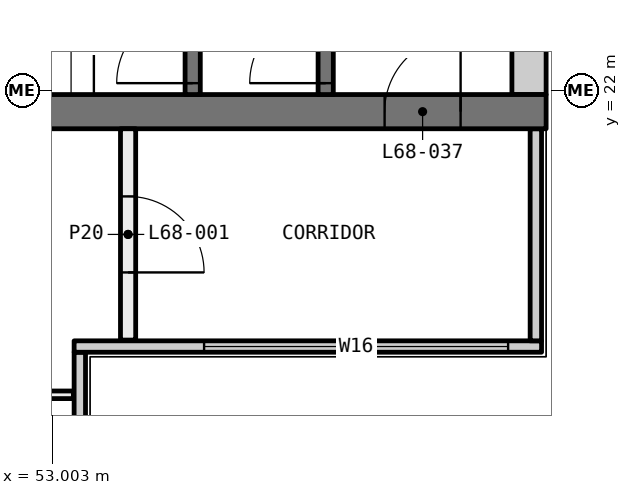
"""IFC4 building model, lengths in metres.
Left out: names, types, materials, properties, quantities, classifications, styles, units other than length and angle.
Written with IfcOpenShell. Run it as: python <this file> out.ifc"""

import sys

from ifc_helpers import new_model, si_unit, direction, frame, frame_2d, origin, place, context, subcontext, project, spatial, rectangle, extrude, element, fill, save


model = new_model("IFC4")
c1 = context("Model", 3, precision=1e-05, world=origin(), true_north=direction((0.0, 1.0)))
c2 = subcontext(c1, "Body", "Model", "MODEL_VIEW")
j1 = project(units=[si_unit("LENGTHUNIT", "METRE"), si_unit("PLANEANGLEUNIT", "RADIAN")], contexts=[c1])
p1 = place(None, origin())
s1 = spatial("IfcSite", under=j1, at=p1, CompositionType="ELEMENT")
p2 = place(p1, origin())
s2 = spatial("IfcBuilding", under=s1, at=p2, CompositionType="ELEMENT")
p3 = place(p2, frame((0.0, 0.0, 252.45)))
s3 = spatial("IfcBuildingStorey", under=s2, at=p3, CompositionType="ELEMENT", Elevation=252.45)
p4 = place(p3, frame((53.365, 12.71, 0.0), z_axis=(0.0, 0.0, 1.0), x_axis=(0.0, 1.0, 0.0)))
e1 = element("IfcWall", 1, at=p4, inside=s3, PredefinedType="ELEMENTEDWALL", context=c2, shape_type="SweptSolid", body=[
    extrude(rectangle(XDim=5.85, YDim=0.15, at=frame_2d((2.925, 0.0))), origin(), (0.0, 0.0, 1.0), 3.05),
])
p5 = place(p4, frame((0.29, 0.0, 0.45)))
e2 = element("IfcOpeningElement", 2, at=p5, cuts=e1, PredefinedType="OPENING", context=c2, shape_type="SweptSolid", body=[
    extrude(rectangle(XDim=4.0, YDim=2.55, at=frame_2d((2.0, 1.275))), frame((0.0, 0.085, 0.0), z_axis=(0.0, -1.0, 0.0), x_axis=(1.0, 0.0, 0.0)), (0.0, 0.0, 1.0), 0.17),
])
p6 = place(p3, frame((53.29, 18.635, 0.0), z_axis=(0.0, 0.0, 1.0), x_axis=(1.0, 0.0, 0.0)))
e3 = element("IfcWall", 3, at=p6, inside=s3, PredefinedType="ELEMENTEDWALL", context=c2, shape_type="SweptSolid", body=[
    extrude(rectangle(XDim=6.15, YDim=0.15, at=frame_2d((3.075, 0.0))), origin(), (0.0, 0.0, 1.0), 3.05),
])
p7 = place(p6, frame((1.71, 0.0, 0.45)))
e4 = element("IfcOpeningElement", 4, at=p7, cuts=e3, PredefinedType="OPENING", context=c2, shape_type="SweptSolid", body=[
    extrude(rectangle(XDim=4.0, YDim=2.55, at=frame_2d((2.0, 1.275))), frame((0.0, 0.085, 0.0), z_axis=(0.0, -1.0, 0.0), x_axis=(1.0, 0.0, 0.0)), (0.0, 0.0, 1.0), 0.17),
])
p8 = place(p3, frame((59.365, 18.71, 0.0), z_axis=(0.0, 0.0, 1.0), x_axis=(0.0, 1.0, 0.0)))
e5 = element("IfcWall", 5, at=p8, inside=s3, PredefinedType="ELEMENTEDWALL", context=c2, shape_type="SweptSolid", body=[
    extrude(rectangle(XDim=2.79, YDim=0.15, at=frame_2d((1.395, 0.0))), origin(), (0.0, 0.0, 1.0), 3.05),
])
p9 = place(p3, frame((53.28, 18.0, 0.0), z_axis=(0.0, 0.0, 1.0), x_axis=(-1.0, 0.0, 0.0)))
e6 = element("IfcWall", 6, at=p9, inside=s3, PredefinedType="PARTITIONING", context=c2, shape_type="SweptSolid", body=[
    extrude(rectangle(XDim=4.78, YDim=0.1, at=frame_2d((2.39, 0.0))), origin(), (0.0, 0.0, 1.0), 3.05),
])
p10 = place(p3, frame((54.0, 18.72, 0.0), z_axis=(0.0, 0.0, 1.0), x_axis=(0.0, 1.0, 0.0)))
e7 = element("IfcWall", 7, at=p10, inside=s3, PredefinedType="PARTITIONING", context=c2, shape_type="SweptSolid", body=[
    extrude(rectangle(XDim=2.78, YDim=0.2, at=frame_2d((1.39, 0.0))), origin(), (0.0, 0.0, 1.0), 3.05),
])
p11 = place(p10, frame((0.89, 0.0, 0.0)))
e8 = element("IfcOpeningElement", 8, at=p11, cuts=e7, PredefinedType="OPENING", context=c2, shape_type="SweptSolid", body=[
    extrude(rectangle(XDim=1.0, YDim=2.1, at=frame_2d((0.5, 1.05))), frame((0.0, 0.11, 0.0), z_axis=(0.0, -1.0, 0.0), x_axis=(1.0, 0.0, 0.0)), (0.0, 0.0, 1.0), 0.22),
])
p12 = place(p3, frame((59.5, 21.725, 0.0), z_axis=(0.0, 0.0, 1.0), x_axis=(-1.0, 0.0, 0.0)))
e9 = element("IfcWall", 9, at=p12, inside=s3, PredefinedType="SHEAR", context=c2, shape_type="SweptSolid", body=[
    extrude(rectangle(XDim=11.0, YDim=0.45, at=frame_2d((5.5, 0.0))), origin(), (0.0, 0.0, 1.0), 3.05),
])
p13 = place(p12, frame((1.125, 0.0, 0.0)))
e10 = element("IfcOpeningElement", 10, at=p13, cuts=e9, PredefinedType="OPENING", context=c2, shape_type="SweptSolid", body=[
    extrude(rectangle(XDim=1.0, YDim=2.1, at=frame_2d((0.5, 1.05))), frame((0.0, 0.235, 0.0), z_axis=(0.0, -1.0, 0.0), x_axis=(1.0, 0.0, 0.0)), (0.0, 0.0, 1.0), 0.47),
])
p14 = place(p3, frame((59.275, 21.95, 0.0), z_axis=(0.0, 0.0, 1.0), x_axis=(0.0, 1.0, 0.0)))
e11 = element("IfcWall", 11, at=p14, inside=s3, PredefinedType="SHEAR", context=c2, shape_type="SweptSolid", body=[
    extrude(rectangle(XDim=16.1, YDim=0.45, at=frame_2d((8.05, 0.0))), origin(), (0.0, 0.0, 1.0), 3.05),
])
p15 = place(p3, frame((56.6, 21.95, 0.0), z_axis=(0.0, 0.0, 1.0), x_axis=(0.0, 1.0, 0.0)))
e12 = element("IfcWall", 12, at=p15, inside=s3, PredefinedType="SOLIDWALL", context=c2, shape_type="SweptSolid", body=[
    extrude(rectangle(XDim=12.95, YDim=0.2, at=frame_2d((6.475, 0.0))), origin(), (0.0, 0.0, 1.0), 3.05),
])
p16 = place(p15, frame((3.75, 0.0, 0.0)))
e13 = element("IfcOpeningElement", 13, at=p16, cuts=e12, PredefinedType="OPENING", context=c2, shape_type="SweptSolid", body=[
    extrude(rectangle(XDim=1.1, YDim=2.1, at=frame_2d((0.55, 1.05))), frame((0.0, 0.11, 0.0), z_axis=(0.0, -1.0, 0.0), x_axis=(1.0, 0.0, 0.0)), (0.0, 0.0, 1.0), 0.22),
])
p17 = place(p15, frame((0.15, 0.0, 0.0)))
e14 = element("IfcOpeningElement", 14, at=p17, cuts=e12, PredefinedType="OPENING", context=c2, shape_type="SweptSolid", body=[
    extrude(rectangle(XDim=1.0, YDim=2.1, at=frame_2d((0.5, 1.05))), frame((0.0, 0.11, 0.0), z_axis=(0.0, -1.0, 0.0), x_axis=(1.0, 0.0, 0.0)), (0.0, 0.0, 1.0), 0.22),
])
p18 = place(p15, frame((7.025, 0.0, 0.0)))
e15 = element("IfcOpeningElement", 15, at=p18, cuts=e12, PredefinedType="OPENING", context=c2, shape_type="SweptSolid", body=[
    extrude(rectangle(XDim=0.9, YDim=2.1, at=frame_2d((0.45, 1.05))), frame((0.0, 0.11, 0.0), z_axis=(0.0, -1.0, 0.0), x_axis=(1.0, 0.0, 0.0)), (0.0, 0.0, 1.0), 0.22),
])
p19 = place(p15, frame((10.675, 0.0, 0.0)))
e16 = element("IfcOpeningElement", 16, at=p19, cuts=e12, PredefinedType="OPENING", context=c2, shape_type="SweptSolid", body=[
    extrude(rectangle(XDim=0.9, YDim=2.1, at=frame_2d((0.45, 1.05))), frame((0.0, 0.11, 0.0), z_axis=(0.0, -1.0, 0.0), x_axis=(1.0, 0.0, 0.0)), (0.0, 0.0, 1.0), 0.22),
])
p20 = place(p3, frame((54.85, 21.95, 0.0), z_axis=(0.0, 0.0, 1.0), x_axis=(0.0, 1.0, 0.0)))
e17 = element("IfcWall", 17, at=p20, inside=s3, PredefinedType="SOLIDWALL", context=c2, shape_type="SweptSolid", body=[
    extrude(rectangle(XDim=2.95, YDim=0.2, at=frame_2d((1.475, 0.0))), origin(), (0.0, 0.0, 1.0), 3.05),
])
p21 = place(p20, frame((0.15, 0.0, 0.0)))
e18 = element("IfcOpeningElement", 18, at=p21, cuts=e17, PredefinedType="OPENING", context=c2, shape_type="SweptSolid", body=[
    extrude(rectangle(XDim=1.0, YDim=2.1, at=frame_2d((0.5, 1.05))), frame((0.0, 0.11, 0.0), z_axis=(0.0, -1.0, 0.0), x_axis=(1.0, 0.0, 0.0)), (0.0, 0.0, 1.0), 0.22),
])
p22 = place(p7, origin())
e19 = element("IfcWindow", 19, at=p22, inside=s3, PartitioningType="SINGLE_PANEL", PredefinedType="WINDOW", context=c2, shape_type="SweptSolid", body=[
    extrude(rectangle(XDim=4.0, YDim=2.55, at=frame_2d((2.0, 1.275))), frame((0.0, 0.03, 0.0), z_axis=(0.0, -1.0, 0.0), x_axis=(1.0, 0.0, 0.0)), (0.0, 0.0, 1.0), 0.06),
])
fill(e4, e19)
p23 = place(p11, frame((1.0, 0.0, 0.0), x_axis=(-1.0, 0.0, 0.0)))
e20 = element("IfcDoor", 20, at=p23, inside=s3, OperationType="SINGLE_SWING_LEFT", PredefinedType="DOOR", context=c2, shape_type="SweptSolid", body=[
    extrude(rectangle(XDim=1.0, YDim=2.1, at=frame_2d((0.5, 1.05))), frame((0.0, 0.025, 0.0), z_axis=(0.0, -1.0, 0.0), x_axis=(1.0, 0.0, 0.0)), (0.0, 0.0, 1.0), 0.05),
])
fill(e8, e20)
p24 = place(p21, origin())
e21 = element("IfcDoor", 21, at=p24, inside=s3, OperationType="SINGLE_SWING_RIGHT", PredefinedType="DOOR", context=c2, shape_type="SweptSolid", body=[
    extrude(rectangle(XDim=1.0, YDim=2.1, at=frame_2d((0.5, 1.05))), frame((0.0, 0.025, 0.0), z_axis=(0.0, -1.0, 0.0), x_axis=(1.0, 0.0, 0.0)), (0.0, 0.0, 1.0), 0.05),
])
fill(e18, e21)
p25 = place(p17, origin())
e22 = element("IfcDoor", 22, at=p25, inside=s3, OperationType="SINGLE_SWING_RIGHT", PredefinedType="DOOR", context=c2, shape_type="SweptSolid", body=[
    extrude(rectangle(XDim=1.0, YDim=2.1, at=frame_2d((0.5, 1.05))), frame((0.0, 0.025, 0.0), z_axis=(0.0, -1.0, 0.0), x_axis=(1.0, 0.0, 0.0)), (0.0, 0.0, 1.0), 0.05),
])
fill(e14, e22)
p26 = place(p13, frame((1.0, 0.0, 0.0), x_axis=(-1.0, 0.0, 0.0)))
e23 = element("IfcDoor", 23, at=p26, inside=s3, OperationType="SINGLE_SWING_LEFT", PredefinedType="DOOR", context=c2, shape_type="SweptSolid", body=[
    extrude(rectangle(XDim=1.0, YDim=2.1, at=frame_2d((0.5, 1.05))), frame((0.0, 0.025, 0.0), z_axis=(0.0, -1.0, 0.0), x_axis=(1.0, 0.0, 0.0)), (0.0, 0.0, 1.0), 0.05),
])
fill(e10, e23)
save(model, sys.argv[1])
